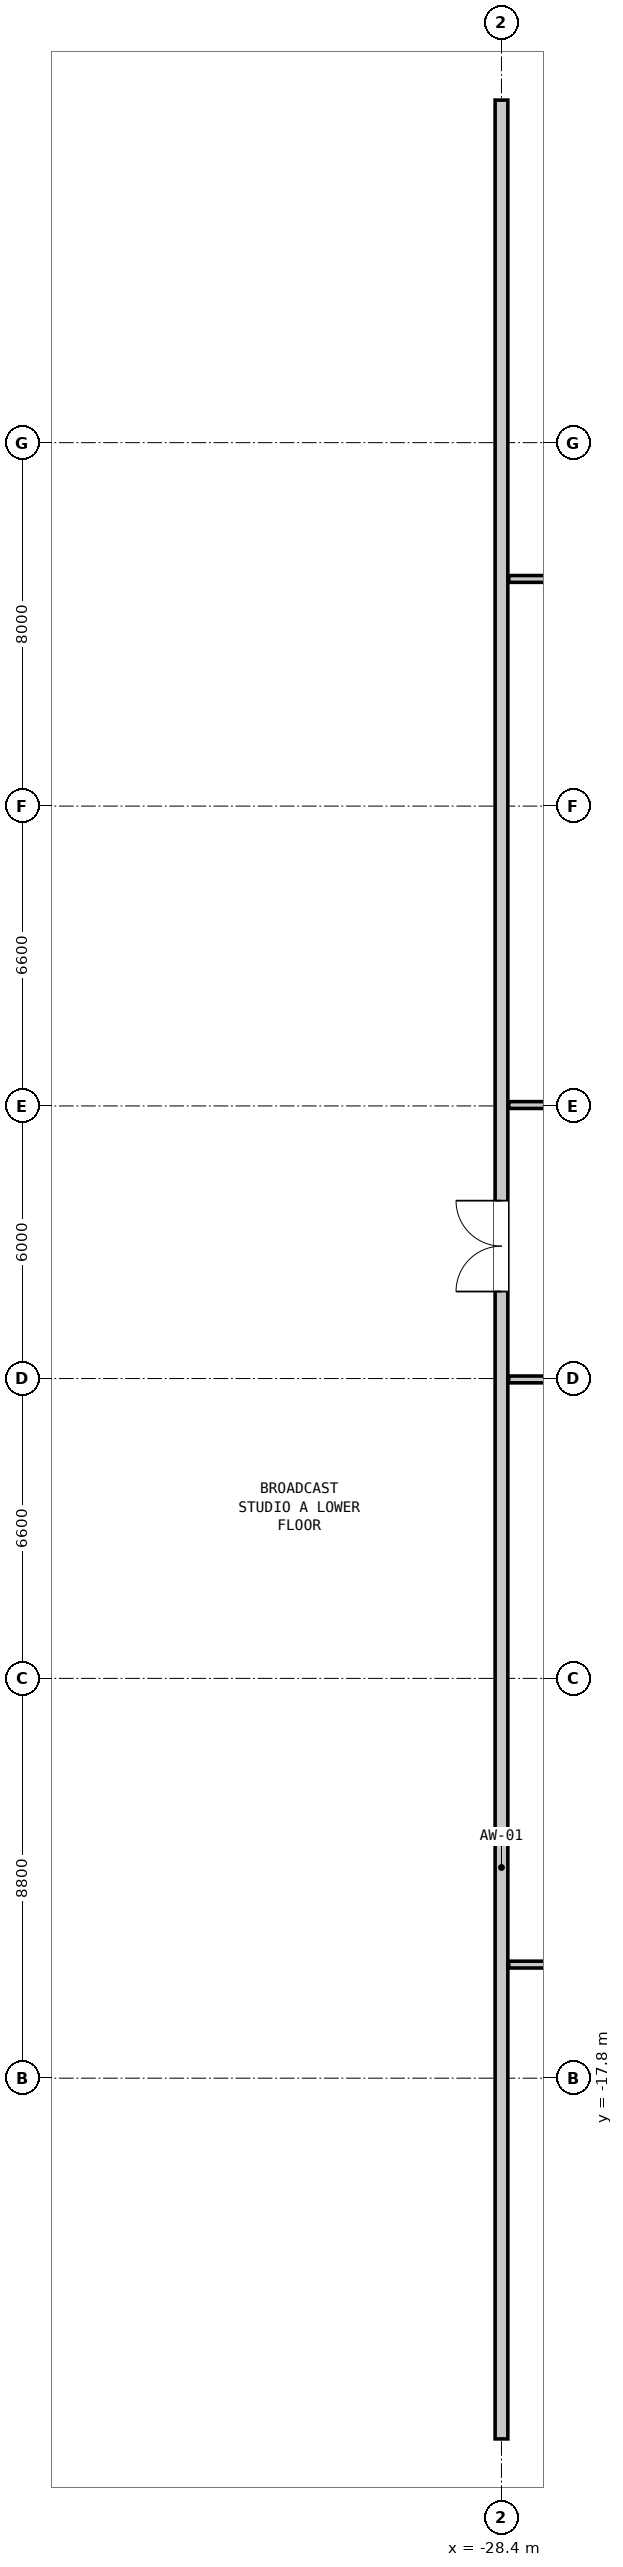
"""IFC4 building model, lengths in metres.
Left out: names, types, materials, properties, quantities, classifications, styles, units other than length and angle.
Written with IfcOpenShell. Run it as: python <this file> out.ifc"""

import sys

from ifc_helpers import new_model, si_unit, direction, frame, frame_2d, origin, place, context, subcontext, project, spatial, rectangle, extrude, element, fill, save


model = new_model("IFC4")
c1 = context("Model", 3, precision=1e-05, world=origin(), true_north=direction((0.0, 1.0)))
c2 = subcontext(c1, "Body", "Model", "MODEL_VIEW")
j1 = project(units=[si_unit("LENGTHUNIT", "METRE"), si_unit("PLANEANGLEUNIT", "RADIAN")], contexts=[c1])
p1 = place(None, origin())
s1 = spatial("IfcSite", under=j1, at=p1, CompositionType="ELEMENT")
p2 = place(p1, origin())
s2 = spatial("IfcBuilding", under=s1, at=p2, CompositionType="ELEMENT")
p3 = place(p2, frame((0.0, 0.0, 5.1)))
s3 = spatial("IfcBuildingStorey", under=s2, at=p3, CompositionType="ELEMENT", Elevation=5.1)
p4 = place(p3, frame((-28.4, -25.74, 0.0), z_axis=(0.0, 0.0, 1.0), x_axis=(0.0, 1.0, 0.0)))
e1 = element("IfcWall", 1, at=p4, inside=s3, PredefinedType="MOVABLE", context=c2, shape_type="SweptSolid", body=[
    extrude(rectangle(XDim=51.48, YDim=0.28, at=frame_2d((25.74, 0.0))), origin(), (0.0, 0.0, 1.0), 3.88),
])
p5 = place(p4, frame((25.255, 0.0, 0.0)))
e2 = element("IfcOpeningElement", 2, at=p5, cuts=e1, PredefinedType="OPENING", context=c2, shape_type="SweptSolid", body=[
    extrude(rectangle(XDim=2.0, YDim=2.14, at=frame_2d((1.0, 1.07))), frame((0.0, 0.152, 0.0), z_axis=(0.0, -1.0, 0.0), x_axis=(1.0, 0.0, 0.0)), (0.0, 0.0, 1.0), 0.304),
])
p6 = place(p3, frame((-28.24, 15.2, 0.0), z_axis=(0.0, 0.0, 1.0), x_axis=(1.0, 0.0, 0.0)))
e3 = element("IfcWall", 3, at=p6, inside=s3, PredefinedType="PARTITIONING", context=c2, shape_type="SweptSolid", body=[
    extrude(rectangle(XDim=24.58, YDim=0.15, at=frame_2d((12.29, 0.0))), origin(), (0.0, 0.0, 1.0), 3.88),
])
p7 = place(p6, frame((18.572, 0.0, 0.0)))
e4 = element("IfcOpeningElement", 4, at=p7, cuts=e3, PredefinedType="OPENING", context=c2, shape_type="SweptSolid", body=[
    extrude(rectangle(XDim=1.2, YDim=2.1, at=frame_2d((0.6, 1.05))), frame((0.0, 0.087, 0.0), z_axis=(0.0, -1.0, 0.0), x_axis=(1.0, 0.0, 0.0)), (0.0, 0.0, 1.0), 0.174),
])
p8 = place(p3, frame((-28.24, -15.3, 0.0), z_axis=(0.0, 0.0, 1.0), x_axis=(1.0, 0.0, 0.0)))
e5 = element("IfcWall", 5, at=p8, inside=s3, PredefinedType="PARTITIONING", context=c2, shape_type="SweptSolid", body=[
    extrude(rectangle(XDim=24.58, YDim=0.15, at=frame_2d((12.29, 0.0))), origin(), (0.0, 0.0, 1.0), 3.88),
])
p9 = place(p8, frame((18.572, 0.0, 0.0)))
e6 = element("IfcOpeningElement", 6, at=p9, cuts=e5, PredefinedType="OPENING", context=c2, shape_type="SweptSolid", body=[
    extrude(rectangle(XDim=1.2, YDim=2.1, at=frame_2d((0.6, 1.05))), frame((0.0, 0.087, 0.0), z_axis=(0.0, -1.0, 0.0), x_axis=(1.0, 0.0, 0.0)), (0.0, 0.0, 1.0), 0.174),
])
p10 = place(p3, frame((-28.24, -2.42, 0.0), z_axis=(0.0, 0.0, 1.0), x_axis=(1.0, 0.0, 0.0)))
e7 = element("IfcWall", 7, at=p10, inside=s3, PredefinedType="PARTITIONING", context=c2, shape_type="SweptSolid", body=[
    extrude(rectangle(XDim=8.73, YDim=0.15, at=frame_2d((4.365, 0.0))), origin(), (0.0, 0.0, 1.0), 2.742),
])
p11 = place(p3, frame((-28.24, 3.62, 0.0), z_axis=(0.0, 0.0, 1.0), x_axis=(1.0, 0.0, 0.0)))
e8 = element("IfcWall", 8, at=p11, inside=s3, PredefinedType="PARTITIONING", context=c2, shape_type="SweptSolid", body=[
    extrude(rectangle(XDim=9.48, YDim=0.15, at=frame_2d((4.74, 0.0))), origin(), (0.0, 0.0, 1.0), 2.742),
])
p12 = place(p11, frame((4.265, 0.0, 0.0)))
e9 = element("IfcOpeningElement", 9, at=p12, cuts=e8, PredefinedType="OPENING", context=c2, shape_type="SweptSolid", body=[
    extrude(rectangle(XDim=0.95, YDim=2.1, at=frame_2d((0.475, 1.05))), frame((0.0, 0.087, 0.0), z_axis=(0.0, -1.0, 0.0), x_axis=(1.0, 0.0, 0.0)), (0.0, 0.0, 1.0), 0.174),
])
p13 = place(p5, origin())
e10 = element("IfcDoor", 10, at=p13, inside=s3, OperationType="DOUBLE_DOOR_SINGLE_SWING", PredefinedType="DOOR", context=c2, shape_type="SweptSolid", body=[
    extrude(rectangle(XDim=2.0, YDim=2.14, at=frame_2d((1.0, 1.07))), frame((0.0, 0.025, 0.0), z_axis=(0.0, -1.0, 0.0), x_axis=(1.0, 0.0, 0.0)), (0.0, 0.0, 1.0), 0.05),
])
fill(e2, e10)
save(model, sys.argv[1])
